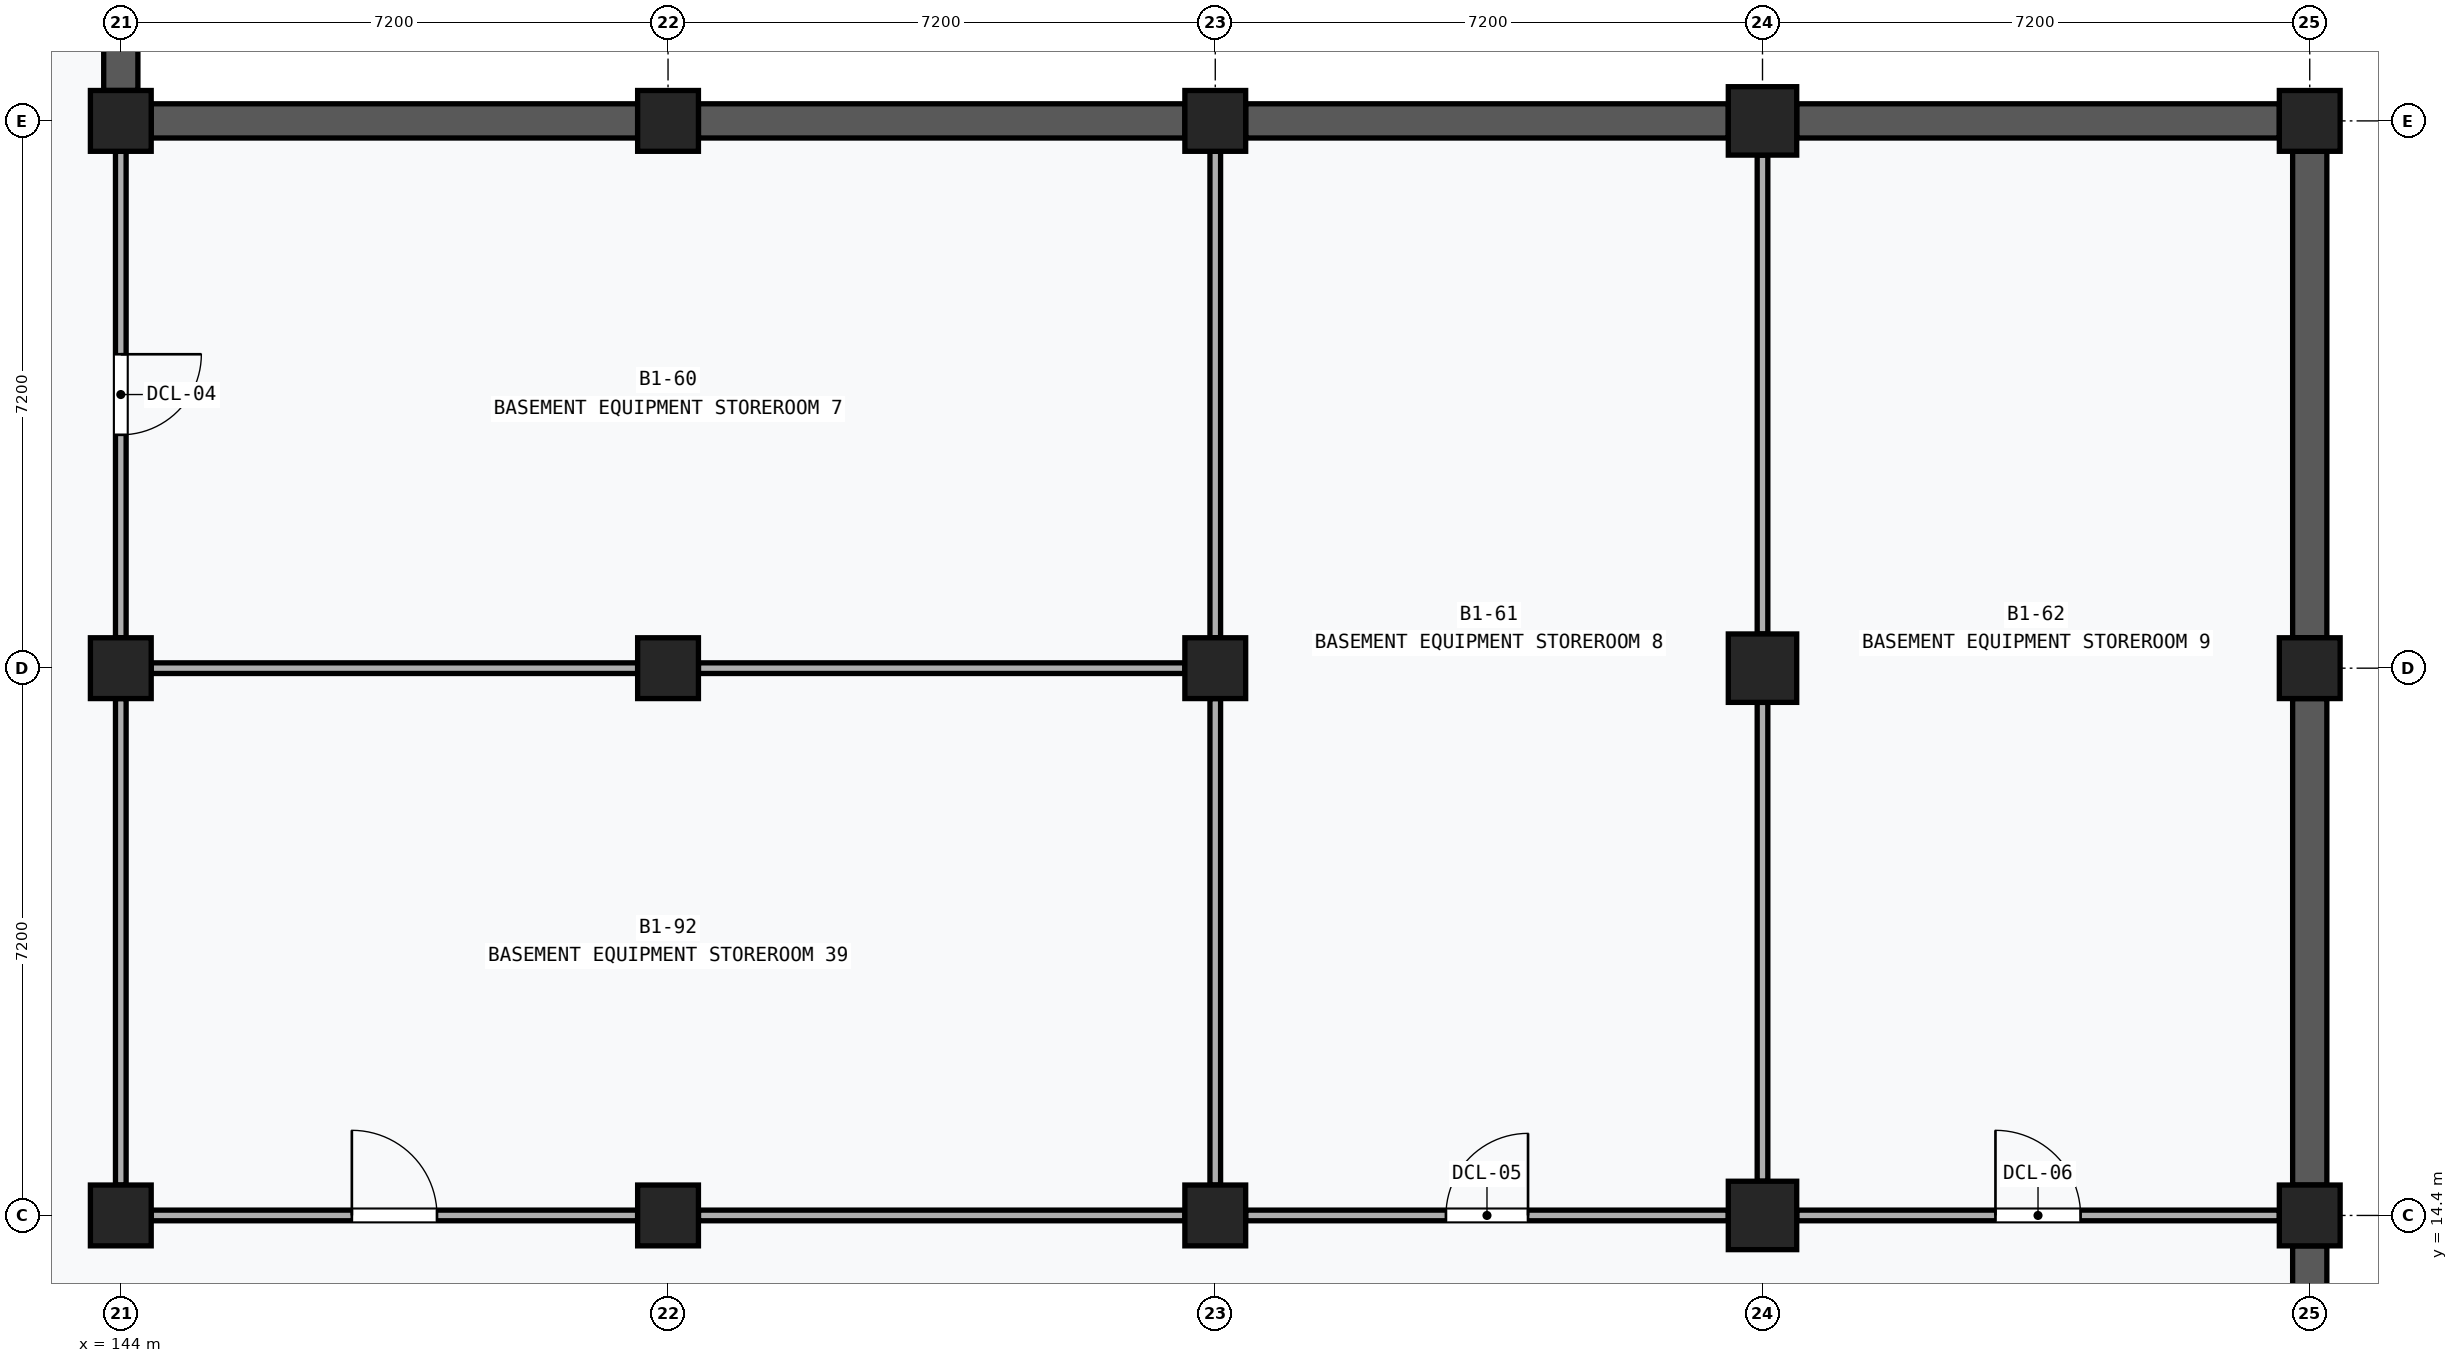
"""IFC4 building model, lengths in metres.
Left out: names, types, materials, properties, quantities, classifications, styles, units other than length and angle.
Written with IfcOpenShell. Run it as: python <this file> out.ifc"""

import sys

from ifc_helpers import new_model, si_unit, direction, frame, frame_2d, origin, origin_2d, place, context, subcontext, project, spatial, rectangle, extrude, element, fill, save


model = new_model("IFC4")
c1 = context("Model", 3, precision=1e-05, world=origin(), true_north=direction((0.0, 1.0)))
c2 = subcontext(c1, "Body", "Model", "MODEL_VIEW")
j1 = project(units=[si_unit("LENGTHUNIT", "METRE"), si_unit("PLANEANGLEUNIT", "RADIAN")], contexts=[c1])
p1 = place(None, origin())
s1 = spatial("IfcSite", under=j1, at=p1, CompositionType="ELEMENT")
p2 = place(p1, origin())
s2 = spatial("IfcBuilding", under=s1, at=p2, CompositionType="ELEMENT")
p3 = place(p2, frame((0.0, 0.0, -4.5)))
s3 = spatial("IfcBuildingStorey", under=s2, at=p3, CompositionType="ELEMENT", Elevation=-4.5)
for number, where, z_axis, x_axis in (
    (1, (144.0, 14.4, 0.0), (0.0, 0.0, 1.0), (1.0, 0.0, 0.0)),
    (2, (144.0, 21.6, 0.0), (0.0, 0.0, 1.0), (1.0, 0.0, 0.0)),
    (3, (144.0, 28.8, 0.0), (0.0, 0.0, 1.0), (1.0, 0.0, 0.0)),
    (4, (151.2, 14.4, 0.0), (0.0, 0.0, 1.0), (1.0, 0.0, 0.0)),
    (5, (151.2, 21.6, 0.0), (0.0, 0.0, 1.0), (1.0, 0.0, 0.0)),
    (6, (151.2, 28.8, 0.0), (0.0, 0.0, 1.0), (1.0, 0.0, 0.0)),
    (7, (158.4, 14.4, 0.0), (0.0, 0.0, 1.0), (1.0, 0.0, 0.0)),
    (8, (158.4, 21.6, 0.0), (0.0, 0.0, 1.0), (1.0, 0.0, 0.0)),
    (9, (158.4, 28.8, 0.0), (0.0, 0.0, 1.0), (1.0, 0.0, 0.0)),
):
    element("IfcColumn", number, at=place(p3, frame(where, z_axis=z_axis, x_axis=x_axis)), inside=s3, PredefinedType="COLUMN", context=c2, shape_type="SweptSolid", body=[
        extrude(rectangle(XDim=0.8, YDim=0.8, at=origin_2d()), origin(), (0.0, 0.0, 1.0), 4.5),
    ])
for number, where, z_axis, x_axis in (
    (10, (165.6, 14.4, 0.0), (0.0, 0.0, 1.0), (1.0, 0.0, 0.0)),
    (11, (165.6, 21.6, 0.0), (0.0, 0.0, 1.0), (1.0, 0.0, 0.0)),
    (12, (165.6, 28.8, 0.0), (0.0, 0.0, 1.0), (1.0, 0.0, 0.0)),
):
    element("IfcColumn", number, at=place(p3, frame(where, z_axis=z_axis, x_axis=x_axis)), inside=s3, PredefinedType="COLUMN", context=c2, shape_type="SweptSolid", body=[
        extrude(rectangle(XDim=0.9, YDim=0.9, at=origin_2d()), origin(), (0.0, 0.0, 1.0), 4.5),
    ])
for number, where, z_axis, x_axis in (
    (13, (172.8, 14.4, 0.0), (0.0, 0.0, 1.0), (1.0, 0.0, 0.0)),
    (14, (172.8, 21.6, 0.0), (0.0, 0.0, 1.0), (1.0, 0.0, 0.0)),
    (15, (172.8, 28.8, 0.0), (0.0, 0.0, 1.0), (1.0, 0.0, 0.0)),
):
    element("IfcColumn", number, at=place(p3, frame(where, z_axis=z_axis, x_axis=x_axis)), inside=s3, PredefinedType="COLUMN", context=c2, shape_type="SweptSolid", body=[
        extrude(rectangle(XDim=0.8, YDim=0.8, at=origin_2d()), origin(), (0.0, 0.0, 1.0), 4.5),
    ])
for number, where, z_axis, x_axis in (
    (16, (144.0, 29.2, 0.0), (0.0, 0.0, 1.0), (0.0, 1.0, 0.0)),
    (17, (144.4, 28.8, 0.0), (0.0, 0.0, 1.0), (1.0, 0.0, 0.0)),
):
    element("IfcWall", number, at=place(p3, frame(where, z_axis=z_axis, x_axis=x_axis)), inside=s3, PredefinedType="SOLIDWALL", context=c2, shape_type="SweptSolid", body=[
        extrude(rectangle(XDim=6.4, YDim=0.45, at=frame_2d((3.2, 0.0))), origin(), (0.0, 0.0, 1.0), 3.57),
    ])
p4 = place(p3, frame((151.6, 28.8, 0.0), z_axis=(0.0, 0.0, 1.0), x_axis=(1.0, 0.0, 0.0)))
e18 = element("IfcWall", 18, at=p4, inside=s3, PredefinedType="SOLIDWALL", context=c2, shape_type="SweptSolid", body=[
    extrude(rectangle(XDim=6.4, YDim=0.45, at=frame_2d((3.2, 0.0))), origin(), (0.0, 0.0, 1.0), 3.57),
])
p5 = place(p3, frame((158.8, 28.8, 0.0), z_axis=(0.0, 0.0, 1.0), x_axis=(1.0, 0.0, 0.0)))
e19 = element("IfcWall", 19, at=p5, inside=s3, PredefinedType="SOLIDWALL", context=c2, shape_type="SweptSolid", body=[
    extrude(rectangle(XDim=6.35, YDim=0.45, at=frame_2d((3.175, 0.0))), origin(), (0.0, 0.0, 1.0), 3.57),
])
for number, where, z_axis, x_axis in (
    (20, (172.8, 7.6, 0.0), (0.0, 0.0, 1.0), (0.0, 1.0, 0.0)),
    (21, (172.8, 14.8, 0.0), (0.0, 0.0, 1.0), (0.0, 1.0, 0.0)),
):
    element("IfcWall", number, at=place(p3, frame(where, z_axis=z_axis, x_axis=x_axis)), inside=s3, PredefinedType="SOLIDWALL", context=c2, shape_type="SweptSolid", body=[
        extrude(rectangle(XDim=6.4, YDim=0.45, at=frame_2d((3.2, 0.0))), origin(), (0.0, 0.0, 1.0), 3.57),
    ])
p6 = place(p3, frame((166.05, 28.8, 0.0), z_axis=(0.0, 0.0, 1.0), x_axis=(1.0, 0.0, 0.0)))
e22 = element("IfcWall", 22, at=p6, inside=s3, PredefinedType="SOLIDWALL", context=c2, shape_type="SweptSolid", body=[
    extrude(rectangle(XDim=6.35, YDim=0.45, at=frame_2d((3.175, 0.0))), origin(), (0.0, 0.0, 1.0), 3.57),
])
p7 = place(p3, frame((172.8, 22.0, 0.0), z_axis=(0.0, 0.0, 1.0), x_axis=(0.0, 1.0, 0.0)))
e23 = element("IfcWall", 23, at=p7, inside=s3, PredefinedType="SOLIDWALL", context=c2, shape_type="SweptSolid", body=[
    extrude(rectangle(XDim=6.4, YDim=0.45, at=frame_2d((3.2, 0.0))), origin(), (0.0, 0.0, 1.0), 3.57),
])
p8 = place(p3, frame((144.4, 21.6, 0.0), z_axis=(0.0, 0.0, 1.0), x_axis=(1.0, 0.0, 0.0)))
e24 = element("IfcWall", 24, at=p8, inside=s3, PredefinedType="PARTITIONING", context=c2, shape_type="SweptSolid", body=[
    extrude(rectangle(XDim=6.4, YDim=0.14, at=frame_2d((3.2, 0.0))), origin(), (0.0, 0.0, 1.0), 3.3),
])
p9 = place(p3, frame((144.0, 22.0, 0.0), z_axis=(0.0, 0.0, 1.0), x_axis=(0.0, 1.0, 0.0)))
e25 = element("IfcWall", 25, at=p9, inside=s3, PredefinedType="PARTITIONING", context=c2, shape_type="SweptSolid", body=[
    extrude(rectangle(XDim=6.4, YDim=0.14, at=frame_2d((3.2, 0.0))), origin(), (0.0, 0.0, 1.0), 3.3),
])
p10 = place(p9, frame((2.67, 0.0, 0.0)))
e26 = element("IfcOpeningElement", 26, at=p10, cuts=e25, PredefinedType="OPENING", context=c2, shape_type="SweptSolid", body=[
    extrude(rectangle(XDim=1.06, YDim=2.16, at=frame_2d((0.53, 1.08))), frame((0.0, 0.082, 0.0), z_axis=(0.0, -1.0, 0.0), x_axis=(1.0, 0.0, 0.0)), (0.0, 0.0, 1.0), 0.164),
])
for number, where, z_axis, x_axis in (
    (27, (151.6, 21.6, 0.0), (0.0, 0.0, 1.0), (1.0, 0.0, 0.0)),
    (28, (158.4, 22.0, 0.0), (0.0, 0.0, 1.0), (0.0, 1.0, 0.0)),
):
    element("IfcWall", number, at=place(p3, frame(where, z_axis=z_axis, x_axis=x_axis)), inside=s3, PredefinedType="PARTITIONING", context=c2, shape_type="SweptSolid", body=[
        extrude(rectangle(XDim=6.4, YDim=0.14, at=frame_2d((3.2, 0.0))), origin(), (0.0, 0.0, 1.0), 3.3),
    ])
p11 = place(p3, frame((158.8, 14.4, 0.0), z_axis=(0.0, 0.0, 1.0), x_axis=(1.0, 0.0, 0.0)))
e29 = element("IfcWall", 29, at=p11, inside=s3, PredefinedType="PARTITIONING", context=c2, shape_type="SweptSolid", body=[
    extrude(rectangle(XDim=6.35, YDim=0.14, at=frame_2d((3.175, 0.0))), origin(), (0.0, 0.0, 1.0), 3.3),
])
p12 = place(p11, frame((2.635, 0.0, 0.0)))
e30 = element("IfcOpeningElement", 30, at=p12, cuts=e29, PredefinedType="OPENING", context=c2, shape_type="SweptSolid", body=[
    extrude(rectangle(XDim=1.08, YDim=2.18, at=frame_2d((0.54, 1.09))), frame((0.0, 0.082, 0.0), z_axis=(0.0, -1.0, 0.0), x_axis=(1.0, 0.0, 0.0)), (0.0, 0.0, 1.0), 0.164),
])
p13 = place(p3, frame((158.4, 14.8, 0.0), z_axis=(0.0, 0.0, 1.0), x_axis=(0.0, 1.0, 0.0)))
e31 = element("IfcWall", 31, at=p13, inside=s3, PredefinedType="PARTITIONING", context=c2, shape_type="SweptSolid", body=[
    extrude(rectangle(XDim=6.4, YDim=0.14, at=frame_2d((3.2, 0.0))), origin(), (0.0, 0.0, 1.0), 3.3),
])
p14 = place(p3, frame((165.6, 14.85, 0.0), z_axis=(0.0, 0.0, 1.0), x_axis=(0.0, 1.0, 0.0)))
e32 = element("IfcWall", 32, at=p14, inside=s3, PredefinedType="PARTITIONING", context=c2, shape_type="SweptSolid", body=[
    extrude(rectangle(XDim=6.3, YDim=0.14, at=frame_2d((3.15, 0.0))), origin(), (0.0, 0.0, 1.0), 3.3),
])
p15 = place(p3, frame((165.6, 22.05, 0.0), z_axis=(0.0, 0.0, 1.0), x_axis=(0.0, 1.0, 0.0)))
e33 = element("IfcWall", 33, at=p15, inside=s3, PredefinedType="PARTITIONING", context=c2, shape_type="SweptSolid", body=[
    extrude(rectangle(XDim=6.3, YDim=0.14, at=frame_2d((3.15, 0.0))), origin(), (0.0, 0.0, 1.0), 3.3),
])
p16 = place(p3, frame((166.05, 14.4, 0.0), z_axis=(0.0, 0.0, 1.0), x_axis=(1.0, 0.0, 0.0)))
e34 = element("IfcWall", 34, at=p16, inside=s3, PredefinedType="PARTITIONING", context=c2, shape_type="SweptSolid", body=[
    extrude(rectangle(XDim=6.35, YDim=0.14, at=frame_2d((3.175, 0.0))), origin(), (0.0, 0.0, 1.0), 3.3),
])
p17 = place(p16, frame((2.615, 0.0, 0.0)))
e35 = element("IfcOpeningElement", 35, at=p17, cuts=e34, PredefinedType="OPENING", context=c2, shape_type="SweptSolid", body=[
    extrude(rectangle(XDim=1.12, YDim=2.2, at=frame_2d((0.56, 1.1))), frame((0.0, 0.082, 0.0), z_axis=(0.0, -1.0, 0.0), x_axis=(1.0, 0.0, 0.0)), (0.0, 0.0, 1.0), 0.164),
])
p18 = place(p3, frame((144.4, 14.4, 0.0), z_axis=(0.0, 0.0, 1.0), x_axis=(1.0, 0.0, 0.0)))
e36 = element("IfcWall", 36, at=p18, inside=s3, PredefinedType="PARTITIONING", context=c2, shape_type="SweptSolid", body=[
    extrude(rectangle(XDim=6.4, YDim=0.14, at=frame_2d((3.2, 0.0))), origin(), (0.0, 0.0, 1.0), 3.3),
])
p19 = place(p18, frame((2.64, 0.0, 0.0)))
e37 = element("IfcOpeningElement", 37, at=p19, cuts=e36, PredefinedType="OPENING", context=c2, shape_type="SweptSolid", body=[
    extrude(rectangle(XDim=1.12, YDim=2.2, at=frame_2d((0.56, 1.1))), frame((0.0, 0.082, 0.0), z_axis=(0.0, -1.0, 0.0), x_axis=(1.0, 0.0, 0.0)), (0.0, 0.0, 1.0), 0.164),
])
for number, where, z_axis, x_axis in (
    (38, (144.0, 14.8, 0.0), (0.0, 0.0, 1.0), (0.0, 1.0, 0.0)),
    (39, (151.6, 14.4, 0.0), (0.0, 0.0, 1.0), (1.0, 0.0, 0.0)),
):
    element("IfcWall", number, at=place(p3, frame(where, z_axis=z_axis, x_axis=x_axis)), inside=s3, PredefinedType="PARTITIONING", context=c2, shape_type="SweptSolid", body=[
        extrude(rectangle(XDim=6.4, YDim=0.14, at=frame_2d((3.2, 0.0))), origin(), (0.0, 0.0, 1.0), 3.3),
    ])
p20 = place(p10, frame((1.06, 0.0, 0.0), z_axis=(0.0, 0.0, 1.0), x_axis=(-1.0, 0.0, 0.0)))
e40 = element("IfcDoor", 40, at=p20, inside=s3, OperationType="SINGLE_SWING_LEFT", PredefinedType="DOOR", context=c2, shape_type="SweptSolid", body=[
    extrude(rectangle(XDim=1.06, YDim=2.16, at=frame_2d((0.53, 1.08))), frame((0.0, 0.025, 0.0), z_axis=(0.0, -1.0, 0.0), x_axis=(1.0, 0.0, 0.0)), (0.0, 0.0, 1.0), 0.05),
])
fill(e26, e40)
p21 = place(p12, origin())
e41 = element("IfcDoor", 41, at=p21, inside=s3, OperationType="SINGLE_SWING_RIGHT", PredefinedType="DOOR", context=c2, shape_type="SweptSolid", body=[
    extrude(rectangle(XDim=1.08, YDim=2.18, at=frame_2d((0.54, 1.09))), frame((0.0, 0.025, 0.0), z_axis=(0.0, -1.0, 0.0), x_axis=(1.0, 0.0, 0.0)), (0.0, 0.0, 1.0), 0.05),
])
fill(e30, e41)
p22 = place(p17, origin())
e42 = element("IfcDoor", 42, at=p22, inside=s3, OperationType="SINGLE_SWING_LEFT", PredefinedType="DOOR", context=c2, shape_type="SweptSolid", body=[
    extrude(rectangle(XDim=1.12, YDim=2.2, at=frame_2d((0.56, 1.1))), frame((0.0, 0.025, 0.0), z_axis=(0.0, -1.0, 0.0), x_axis=(1.0, 0.0, 0.0)), (0.0, 0.0, 1.0), 0.05),
])
fill(e35, e42)
p23 = place(p19, origin())
e43 = element("IfcDoor", 43, at=p23, inside=s3, OperationType="SINGLE_SWING_LEFT", PredefinedType="DOOR", context=c2, shape_type="SweptSolid", body=[
    extrude(rectangle(XDim=1.12, YDim=2.2, at=frame_2d((0.56, 1.1))), frame((0.0, 0.025, 0.0), z_axis=(0.0, -1.0, 0.0), x_axis=(1.0, 0.0, 0.0)), (0.0, 0.0, 1.0), 0.05),
])
fill(e37, e43)
save(model, sys.argv[1])
